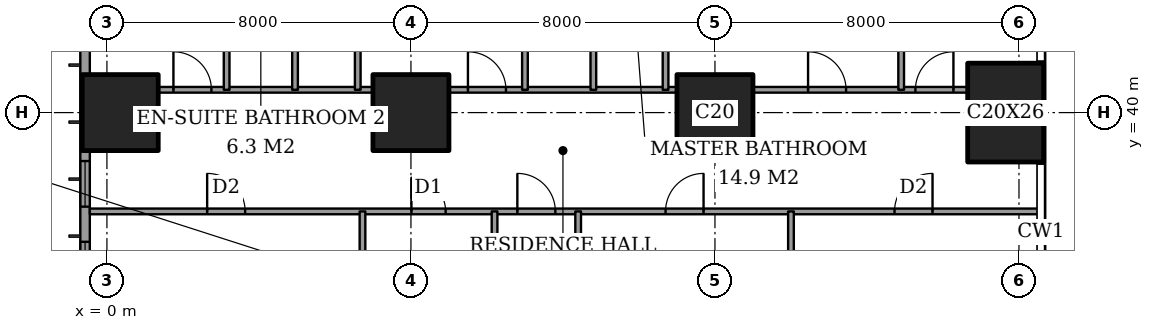
"""IFC4 building model, lengths in metres.
Left out: names, types, materials, properties, quantities, classifications, styles, units other than length and angle.
Written with IfcOpenShell. Run it as: python <this file> out.ifc"""

import sys

from ifc_helpers import new_model, si_unit, direction, frame, frame_2d, origin, origin_2d, place, context, subcontext, project, spatial, rectangle, extrude, element, fill, save


model = new_model("IFC4")
c1 = context("Model", 3, precision=1e-05, world=origin(), true_north=direction((0.0, 1.0)))
c2 = subcontext(c1, "Body", "Model", "MODEL_VIEW")
j1 = project(units=[si_unit("LENGTHUNIT", "METRE"), si_unit("PLANEANGLEUNIT", "RADIAN")], contexts=[c1])
p1 = place(None, origin())
s1 = spatial("IfcSite", under=j1, at=p1, CompositionType="ELEMENT")
p2 = place(p1, origin())
s2 = spatial("IfcBuilding", under=s1, at=p2, CompositionType="ELEMENT")
p3 = place(p2, frame((0.0, 0.0, 121.4)))
s3 = spatial("IfcBuildingStorey", under=s2, at=p3, CompositionType="ELEMENT", Elevation=121.4)
for number, where, z_axis, x_axis in (
    (1, (0.35, 40.0, 0.0), (0.0, 0.0, 1.0), (1.0, 0.0, 0.0)),
    (2, (8.0, 40.0, 0.0), (0.0, 0.0, 1.0), (1.0, 0.0, 0.0)),
    (3, (16.0, 40.0, 0.0), (0.0, 0.0, 1.0), (1.0, 0.0, 0.0)),
):
    element("IfcColumn", number, at=place(p3, frame(where, z_axis=z_axis, x_axis=x_axis)), inside=s3, PredefinedType="COLUMN", context=c2, shape_type="SweptSolid", body=[
        extrude(rectangle(XDim=2.0, YDim=2.0, at=origin_2d()), origin(), (0.0, 0.0, 1.0), 3.6),
    ])
p4 = place(p3, frame((23.65, 40.0, 0.0), z_axis=(0.0, 0.0, 1.0), x_axis=(1.0, 0.0, 0.0)))
e4 = element("IfcColumn", 4, at=p4, inside=s3, PredefinedType="COLUMN", context=c2, shape_type="SweptSolid", body=[
    extrude(rectangle(XDim=2.0, YDim=2.6, at=origin_2d()), origin(), (0.0, 0.0, 1.0), 3.6),
])
p5 = place(p3, frame((-0.575, 44.825, 0.0), z_axis=(0.0, 0.0, 1.0), x_axis=(0.0, -1.0, 0.0)))
e5 = element("IfcWall", 5, at=p5, inside=s3, PredefinedType="SOLIDWALL", context=c2, shape_type="SweptSolid", body=[
    extrude(rectangle(XDim=41.65, YDim=0.25, at=frame_2d((20.825, 0.0))), origin(), (0.0, 0.0, 1.0), 3.6),
])
p6 = place(p5, frame((0.775, 0.0, 0.4)))
e6 = element("IfcOpeningElement", 6, at=p6, cuts=e5, PredefinedType="OPENING", context=c2, shape_type="SweptSolid", body=[
    extrude(rectangle(XDim=2.4, YDim=2.2, at=frame_2d((1.2, 1.1))), frame((0.0, 0.135, 0.0), z_axis=(0.0, -1.0, 0.0), x_axis=(1.0, 0.0, 0.0)), (0.0, 0.0, 1.0), 0.27),
])
p7 = place(p5, frame((6.1, 0.0, 0.4)))
e7 = element("IfcOpeningElement", 7, at=p7, cuts=e5, PredefinedType="OPENING", context=c2, shape_type="SweptSolid", body=[
    extrude(rectangle(XDim=1.2, YDim=2.2, at=frame_2d((0.6, 1.1))), frame((0.0, 0.135, 0.0), z_axis=(0.0, -1.0, 0.0), x_axis=(1.0, 0.0, 0.0)), (0.0, 0.0, 1.0), 0.27),
])
p8 = place(p5, frame((8.225, 0.0, 0.4)))
e8 = element("IfcOpeningElement", 8, at=p8, cuts=e5, PredefinedType="OPENING", context=c2, shape_type="SweptSolid", body=[
    extrude(rectangle(XDim=2.4, YDim=2.2, at=frame_2d((1.2, 1.1))), frame((0.0, 0.135, 0.0), z_axis=(0.0, -1.0, 0.0), x_axis=(1.0, 0.0, 0.0)), (0.0, 0.0, 1.0), 0.27),
])
p9 = place(p5, frame((15.625, 0.0, 0.4)))
e9 = element("IfcOpeningElement", 9, at=p9, cuts=e5, PredefinedType="OPENING", context=c2, shape_type="SweptSolid", body=[
    extrude(rectangle(XDim=2.4, YDim=2.2, at=frame_2d((1.2, 1.1))), frame((0.0, 0.135, 0.0), z_axis=(0.0, -1.0, 0.0), x_axis=(1.0, 0.0, 0.0)), (0.0, 0.0, 1.0), 0.27),
])
p10 = place(p5, frame((23.625, 0.0, 0.4)))
e10 = element("IfcOpeningElement", 10, at=p10, cuts=e5, PredefinedType="OPENING", context=c2, shape_type="SweptSolid", body=[
    extrude(rectangle(XDim=2.4, YDim=2.2, at=frame_2d((1.2, 1.1))), frame((0.0, 0.135, 0.0), z_axis=(0.0, -1.0, 0.0), x_axis=(1.0, 0.0, 0.0)), (0.0, 0.0, 1.0), 0.27),
])
p11 = place(p5, frame((30.825, 0.0, 0.4)))
e11 = element("IfcOpeningElement", 11, at=p11, cuts=e5, PredefinedType="OPENING", context=c2, shape_type="SweptSolid", body=[
    extrude(rectangle(XDim=2.4, YDim=2.2, at=frame_2d((1.2, 1.1))), frame((0.0, 0.135, 0.0), z_axis=(0.0, -1.0, 0.0), x_axis=(1.0, 0.0, 0.0)), (0.0, 0.0, 1.0), 0.27),
])
p12 = place(p5, frame((34.5, 0.0, 0.4)))
e12 = element("IfcOpeningElement", 12, at=p12, cuts=e5, PredefinedType="OPENING", context=c2, shape_type="SweptSolid", body=[
    extrude(rectangle(XDim=1.2, YDim=2.2, at=frame_2d((0.6, 1.1))), frame((0.0, 0.135, 0.0), z_axis=(0.0, -1.0, 0.0), x_axis=(1.0, 0.0, 0.0)), (0.0, 0.0, 1.0), 0.27),
])
p13 = place(p5, frame((38.475, 0.0, 0.4)))
e13 = element("IfcOpeningElement", 13, at=p13, cuts=e5, PredefinedType="OPENING", context=c2, shape_type="SweptSolid", body=[
    extrude(rectangle(XDim=2.4, YDim=2.2, at=frame_2d((1.2, 1.1))), frame((0.0, 0.135, 0.0), z_axis=(0.0, -1.0, 0.0), x_axis=(1.0, 0.0, 0.0)), (0.0, 0.0, 1.0), 0.27),
])
p14 = place(p3, frame((-0.45, 37.4, 0.0), z_axis=(0.0, 0.0, 1.0), x_axis=(1.0, 0.0, 0.0)))
e14 = element("IfcWall", 14, at=p14, inside=s3, PredefinedType="PARTITIONING", context=c2, shape_type="SweptSolid", body=[
    extrude(rectangle(XDim=25.011, YDim=0.15, at=frame_2d((12.505, 0.0))), origin(), (0.0, 0.0, 1.0), 3.35),
])
p15 = place(p14, frame((11.25, 0.0, 0.0)))
e15 = element("IfcOpeningElement", 15, at=p15, cuts=e14, PredefinedType="OPENING", context=c2, shape_type="SweptSolid", body=[
    extrude(rectangle(XDim=1.0, YDim=2.1, at=frame_2d((0.5, 1.05))), frame((0.0, 0.085, 0.0), z_axis=(0.0, -1.0, 0.0), x_axis=(1.0, 0.0, 0.0)), (0.0, 0.0, 1.0), 0.17),
])
p16 = place(p14, frame((3.087, 0.0, 0.0)))
e16 = element("IfcOpeningElement", 16, at=p16, cuts=e14, PredefinedType="OPENING", context=c2, shape_type="SweptSolid", body=[
    extrude(rectangle(XDim=1.0, YDim=2.1, at=frame_2d((0.5, 1.05))), frame((0.0, 0.085, 0.0), z_axis=(0.0, -1.0, 0.0), x_axis=(1.0, 0.0, 0.0)), (0.0, 0.0, 1.0), 0.17),
])
p17 = place(p14, frame((8.462, 0.0, 0.0)))
e17 = element("IfcOpeningElement", 17, at=p17, cuts=e14, PredefinedType="OPENING", context=c2, shape_type="SweptSolid", body=[
    extrude(rectangle(XDim=0.9, YDim=2.1, at=frame_2d((0.45, 1.05))), frame((0.0, 0.085, 0.0), z_axis=(0.0, -1.0, 0.0), x_axis=(1.0, 0.0, 0.0)), (0.0, 0.0, 1.0), 0.17),
])
p18 = place(p14, frame((15.15, 0.0, 0.0)))
e18 = element("IfcOpeningElement", 18, at=p18, cuts=e14, PredefinedType="OPENING", context=c2, shape_type="SweptSolid", body=[
    extrude(rectangle(XDim=1.0, YDim=2.1, at=frame_2d((0.5, 1.05))), frame((0.0, 0.085, 0.0), z_axis=(0.0, -1.0, 0.0), x_axis=(1.0, 0.0, 0.0)), (0.0, 0.0, 1.0), 0.17),
])
p19 = place(p14, frame((21.175, 0.0, 0.0)))
e19 = element("IfcOpeningElement", 19, at=p19, cuts=e14, PredefinedType="OPENING", context=c2, shape_type="SweptSolid", body=[
    extrude(rectangle(XDim=1.0, YDim=2.1, at=frame_2d((0.5, 1.05))), frame((0.0, 0.085, 0.0), z_axis=(0.0, -1.0, 0.0), x_axis=(1.0, 0.0, 0.0)), (0.0, 0.0, 1.0), 0.17),
])
p20 = place(p3, frame((1.35, 40.6, 0.0), z_axis=(0.0, 0.0, 1.0), x_axis=(1.0, 0.0, 0.0)))
e20 = element("IfcWall", 20, at=p20, inside=s3, PredefinedType="PARTITIONING", context=c2, shape_type="SweptSolid", body=[
    extrude(rectangle(XDim=5.65, YDim=0.15, at=frame_2d((2.825, 0.0))), origin(), (0.0, 0.0, 1.0), 3.35),
])
p21 = place(p20, frame((0.4, 0.0, 0.0)))
e21 = element("IfcOpeningElement", 21, at=p21, cuts=e20, PredefinedType="OPENING", context=c2, shape_type="SweptSolid", body=[
    extrude(rectangle(XDim=1.0, YDim=2.1, at=frame_2d((0.5, 1.05))), frame((0.0, 0.085, 0.0), z_axis=(0.0, -1.0, 0.0), x_axis=(1.0, 0.0, 0.0)), (0.0, 0.0, 1.0), 0.17),
])
p22 = place(p3, frame((9.0, 40.6, 0.0), z_axis=(0.0, 0.0, 1.0), x_axis=(1.0, 0.0, 0.0)))
e22 = element("IfcWall", 22, at=p22, inside=s3, PredefinedType="PARTITIONING", context=c2, shape_type="SweptSolid", body=[
    extrude(rectangle(XDim=6.0, YDim=0.15, at=frame_2d((3.0, 0.0))), origin(), (0.0, 0.0, 1.0), 3.35),
])
p23 = place(p22, frame((0.5, 0.0, 0.0)))
e23 = element("IfcOpeningElement", 23, at=p23, cuts=e22, PredefinedType="OPENING", context=c2, shape_type="SweptSolid", body=[
    extrude(rectangle(XDim=1.0, YDim=2.1, at=frame_2d((0.5, 1.05))), frame((0.0, 0.085, 0.0), z_axis=(0.0, -1.0, 0.0), x_axis=(1.0, 0.0, 0.0)), (0.0, 0.0, 1.0), 0.17),
])
p24 = place(p3, frame((17.0, 40.6, 0.0), z_axis=(0.0, 0.0, 1.0), x_axis=(1.0, 0.0, 0.0)))
e24 = element("IfcWall", 24, at=p24, inside=s3, PredefinedType="PARTITIONING", context=c2, shape_type="SweptSolid", body=[
    extrude(rectangle(XDim=5.65, YDim=0.15, at=frame_2d((2.825, 0.0))), origin(), (0.0, 0.0, 1.0), 3.35),
])
p25 = place(p24, frame((1.45, 0.0, 0.0)))
e25 = element("IfcOpeningElement", 25, at=p25, cuts=e24, PredefinedType="OPENING", context=c2, shape_type="SweptSolid", body=[
    extrude(rectangle(XDim=1.0, YDim=2.1, at=frame_2d((0.5, 1.05))), frame((0.0, 0.085, 0.0), z_axis=(0.0, -1.0, 0.0), x_axis=(1.0, 0.0, 0.0)), (0.0, 0.0, 1.0), 0.17),
])
p26 = place(p24, frame((4.275, 0.0, 0.0)))
e26 = element("IfcOpeningElement", 26, at=p26, cuts=e24, PredefinedType="OPENING", context=c2, shape_type="SweptSolid", body=[
    extrude(rectangle(XDim=1.0, YDim=2.1, at=frame_2d((0.5, 1.05))), frame((0.0, 0.085, 0.0), z_axis=(0.0, -1.0, 0.0), x_axis=(1.0, 0.0, 0.0)), (0.0, 0.0, 1.0), 0.17),
])
p27 = place(p3, frame((3.15, 40.6, 0.0), z_axis=(0.0, 0.0, 1.0), x_axis=(0.0, 1.0, 0.0)))
e27 = element("IfcWall", 27, at=p27, inside=s3, PredefinedType="PARTITIONING", context=c2, shape_type="SweptSolid", body=[
    extrude(rectangle(XDim=3.5, YDim=0.15, at=frame_2d((1.75, 0.0))), origin(), (0.0, 0.0, 1.0), 3.35),
])
p28 = place(p27, frame((1.3, 0.0, 0.0)))
e28 = element("IfcOpeningElement", 28, at=p28, cuts=e27, PredefinedType="OPENING", context=c2, shape_type="SweptSolid", body=[
    extrude(rectangle(XDim=0.9, YDim=2.1, at=frame_2d((0.45, 1.05))), frame((0.0, 0.085, 0.0), z_axis=(0.0, -1.0, 0.0), x_axis=(1.0, 0.0, 0.0)), (0.0, 0.0, 1.0), 0.17),
])
p29 = place(p3, frame((4.95, 40.6, 0.0), z_axis=(0.0, 0.0, 1.0), x_axis=(0.0, 1.0, 0.0)))
e29 = element("IfcWall", 29, at=p29, inside=s3, PredefinedType="PARTITIONING", context=c2, shape_type="SweptSolid", body=[
    extrude(rectangle(XDim=7.85, YDim=0.15, at=frame_2d((3.925, 0.0))), origin(), (0.0, 0.0, 1.0), 3.35),
])
p30 = place(p29, frame((5.225, 0.0, 0.0)))
e30 = element("IfcOpeningElement", 30, at=p30, cuts=e29, PredefinedType="OPENING", context=c2, shape_type="SweptSolid", body=[
    extrude(rectangle(XDim=0.9, YDim=2.1, at=frame_2d((0.45, 1.05))), frame((0.0, 0.085, 0.0), z_axis=(0.0, -1.0, 0.0), x_axis=(1.0, 0.0, 0.0)), (0.0, 0.0, 1.0), 0.17),
])
p31 = place(p3, frame((6.6, 40.6, 0.0), z_axis=(0.0, 0.0, 1.0), x_axis=(0.0, 1.0, 0.0)))
e31 = element("IfcWall", 31, at=p31, inside=s3, PredefinedType="PARTITIONING", context=c2, shape_type="SweptSolid", body=[
    extrude(rectangle(XDim=7.85, YDim=0.15, at=frame_2d((3.925, 0.0))), origin(), (0.0, 0.0, 1.0), 3.35),
])
p32 = place(p3, frame((6.725, 33.2, 0.0), z_axis=(0.0, 0.0, 1.0), x_axis=(0.0, 1.0, 0.0)))
e32 = element("IfcWall", 32, at=p32, inside=s3, PredefinedType="PARTITIONING", context=c2, shape_type="SweptSolid", body=[
    extrude(rectangle(XDim=4.2, YDim=0.15, at=frame_2d((2.1, 0.0))), origin(), (0.0, 0.0, 1.0), 3.35),
])
p33 = place(p3, frame((10.2, 28.0, 0.0), z_axis=(0.0, 0.0, 1.0), x_axis=(0.0, 1.0, 0.0)))
e33 = element("IfcWall", 33, at=p33, inside=s3, PredefinedType="PARTITIONING", context=c2, shape_type="SweptSolid", body=[
    extrude(rectangle(XDim=9.4, YDim=0.15, at=frame_2d((4.7, 0.0))), origin(), (0.0, 0.0, 1.0), 3.35),
])
p34 = place(p33, frame((0.837, 0.0, 0.0)))
e34 = element("IfcOpeningElement", 34, at=p34, cuts=e33, PredefinedType="OPENING", context=c2, shape_type="SweptSolid", body=[
    extrude(rectangle(XDim=1.0, YDim=2.1, at=frame_2d((0.5, 1.05))), frame((0.0, 0.085, 0.0), z_axis=(0.0, -1.0, 0.0), x_axis=(1.0, 0.0, 0.0)), (0.0, 0.0, 1.0), 0.17),
])
p35 = place(p3, frame((11.0, 40.6, 0.0), z_axis=(0.0, 0.0, 1.0), x_axis=(0.0, 1.0, 0.0)))
e35 = element("IfcWall", 35, at=p35, inside=s3, PredefinedType="PARTITIONING", context=c2, shape_type="SweptSolid", body=[
    extrude(rectangle(XDim=7.85, YDim=0.15, at=frame_2d((3.925, 0.0))), origin(), (0.0, 0.0, 1.0), 3.35),
])
p36 = place(p35, frame((3.475, 0.0, 0.0)))
e36 = element("IfcOpeningElement", 36, at=p36, cuts=e35, PredefinedType="OPENING", context=c2, shape_type="SweptSolid", body=[
    extrude(rectangle(XDim=0.9, YDim=2.1, at=frame_2d((0.45, 1.05))), frame((0.0, 0.085, 0.0), z_axis=(0.0, -1.0, 0.0), x_axis=(1.0, 0.0, 0.0)), (0.0, 0.0, 1.0), 0.17),
])
p37 = place(p3, frame((12.4, 30.675, 0.0), z_axis=(0.0, 0.0, 1.0), x_axis=(0.0, 1.0, 0.0)))
e37 = element("IfcWall", 37, at=p37, inside=s3, PredefinedType="PARTITIONING", context=c2, shape_type="SweptSolid", body=[
    extrude(rectangle(XDim=6.725, YDim=0.15, at=frame_2d((3.362, 0.0))), origin(), (0.0, 0.0, 1.0), 3.35),
])
p38 = place(p3, frame((12.8, 40.6, 0.0), z_axis=(0.0, 0.0, 1.0), x_axis=(0.0, 1.0, 0.0)))
e38 = element("IfcWall", 38, at=p38, inside=s3, PredefinedType="PARTITIONING", context=c2, shape_type="SweptSolid", body=[
    extrude(rectangle(XDim=7.85, YDim=0.15, at=frame_2d((3.925, 0.0))), origin(), (0.0, 0.0, 1.0), 3.35),
])
p39 = place(p3, frame((14.7, 40.6, 0.0), z_axis=(0.0, 0.0, 1.0), x_axis=(0.0, 1.0, 0.0)))
e39 = element("IfcWall", 39, at=p39, inside=s3, PredefinedType="PARTITIONING", context=c2, shape_type="SweptSolid", body=[
    extrude(rectangle(XDim=7.85, YDim=0.15, at=frame_2d((3.925, 0.0))), origin(), (0.0, 0.0, 1.0), 3.35),
])
p40 = place(p39, frame((3.475, 0.0, 0.0)))
e40 = element("IfcOpeningElement", 40, at=p40, cuts=e39, PredefinedType="OPENING", context=c2, shape_type="SweptSolid", body=[
    extrude(rectangle(XDim=0.9, YDim=2.1, at=frame_2d((0.45, 1.05))), frame((0.0, 0.085, 0.0), z_axis=(0.0, -1.0, 0.0), x_axis=(1.0, 0.0, 0.0)), (0.0, 0.0, 1.0), 0.17),
])
p41 = place(p3, frame((18.0, 28.0, 0.0), z_axis=(0.0, 0.0, 1.0), x_axis=(0.0, 1.0, 0.0)))
e41 = element("IfcWall", 41, at=p41, inside=s3, PredefinedType="PARTITIONING", context=c2, shape_type="SweptSolid", body=[
    extrude(rectangle(XDim=9.4, YDim=0.15, at=frame_2d((4.7, 0.0))), origin(), (0.0, 0.0, 1.0), 3.35),
])
p42 = place(p41, frame((0.837, 0.0, 0.0)))
e42 = element("IfcOpeningElement", 42, at=p42, cuts=e41, PredefinedType="OPENING", context=c2, shape_type="SweptSolid", body=[
    extrude(rectangle(XDim=1.0, YDim=2.1, at=frame_2d((0.5, 1.05))), frame((0.0, 0.085, 0.0), z_axis=(0.0, -1.0, 0.0), x_axis=(1.0, 0.0, 0.0)), (0.0, 0.0, 1.0), 0.17),
])
p43 = place(p3, frame((20.9, 40.6, 0.0), z_axis=(0.0, 0.0, 1.0), x_axis=(0.0, 1.0, 0.0)))
e43 = element("IfcWall", 43, at=p43, inside=s3, PredefinedType="PARTITIONING", context=c2, shape_type="SweptSolid", body=[
    extrude(rectangle(XDim=7.85, YDim=0.15, at=frame_2d((3.925, 0.0))), origin(), (0.0, 0.0, 1.0), 3.35),
])
p44 = place(p7, origin())
e44 = element("IfcWindow", 44, at=p44, inside=s3, PartitioningType="SINGLE_PANEL", PredefinedType="WINDOW", context=c2, shape_type="SweptSolid", body=[
    extrude(rectangle(XDim=1.2, YDim=2.2, at=frame_2d((0.6, 1.1))), frame((0.0, 0.03, 0.0), z_axis=(0.0, -1.0, 0.0), x_axis=(1.0, 0.0, 0.0)), (0.0, 0.0, 1.0), 0.06),
])
fill(e7, e44)
p45 = place(p8, origin())
e45 = element("IfcWindow", 45, at=p45, inside=s3, PartitioningType="SINGLE_PANEL", PredefinedType="WINDOW", context=c2, shape_type="SweptSolid", body=[
    extrude(rectangle(XDim=2.4, YDim=2.2, at=frame_2d((1.2, 1.1))), frame((0.0, 0.03, 0.0), z_axis=(0.0, -1.0, 0.0), x_axis=(1.0, 0.0, 0.0)), (0.0, 0.0, 1.0), 0.06),
])
fill(e8, e45)
p46 = place(p21, origin())
e46 = element("IfcDoor", 46, at=p46, inside=s3, OperationType="SINGLE_SWING_RIGHT", PredefinedType="DOOR", context=c2, shape_type="SweptSolid", body=[
    extrude(rectangle(XDim=1.0, YDim=2.1, at=frame_2d((0.5, 1.05))), frame((0.0, 0.025, 0.0), z_axis=(0.0, -1.0, 0.0), x_axis=(1.0, 0.0, 0.0)), (0.0, 0.0, 1.0), 0.05),
])
fill(e21, e46)
p47 = place(p23, origin())
e47 = element("IfcDoor", 47, at=p47, inside=s3, OperationType="SINGLE_SWING_RIGHT", PredefinedType="DOOR", context=c2, shape_type="SweptSolid", body=[
    extrude(rectangle(XDim=1.0, YDim=2.1, at=frame_2d((0.5, 1.05))), frame((0.0, 0.025, 0.0), z_axis=(0.0, -1.0, 0.0), x_axis=(1.0, 0.0, 0.0)), (0.0, 0.0, 1.0), 0.05),
])
fill(e23, e47)
p48 = place(p25, origin())
e48 = element("IfcDoor", 48, at=p48, inside=s3, OperationType="SINGLE_SWING_RIGHT", PredefinedType="DOOR", context=c2, shape_type="SweptSolid", body=[
    extrude(rectangle(XDim=1.0, YDim=2.1, at=frame_2d((0.5, 1.05))), frame((0.0, 0.025, 0.0), z_axis=(0.0, -1.0, 0.0), x_axis=(1.0, 0.0, 0.0)), (0.0, 0.0, 1.0), 0.05),
])
fill(e25, e48)
p49 = place(p26, origin())
e49 = element("IfcDoor", 49, at=p49, inside=s3, OperationType="SINGLE_SWING_LEFT", PredefinedType="DOOR", context=c2, shape_type="SweptSolid", body=[
    extrude(rectangle(XDim=1.0, YDim=2.1, at=frame_2d((0.5, 1.05))), frame((0.0, 0.025, 0.0), z_axis=(0.0, -1.0, 0.0), x_axis=(1.0, 0.0, 0.0)), (0.0, 0.0, 1.0), 0.05),
])
fill(e26, e49)
p50 = place(p15, origin())
e50 = element("IfcDoor", 50, at=p50, inside=s3, OperationType="SINGLE_SWING_RIGHT", PredefinedType="DOOR", context=c2, shape_type="SweptSolid", body=[
    extrude(rectangle(XDim=1.0, YDim=2.1, at=frame_2d((0.5, 1.05))), frame((0.0, 0.025, 0.0), z_axis=(0.0, -1.0, 0.0), x_axis=(1.0, 0.0, 0.0)), (0.0, 0.0, 1.0), 0.05),
])
fill(e15, e50)
p51 = place(p16, origin())
e51 = element("IfcDoor", 51, at=p51, inside=s3, OperationType="SINGLE_SWING_RIGHT", PredefinedType="DOOR", context=c2, shape_type="SweptSolid", body=[
    extrude(rectangle(XDim=1.0, YDim=2.1, at=frame_2d((0.5, 1.05))), frame((0.0, 0.025, 0.0), z_axis=(0.0, -1.0, 0.0), x_axis=(1.0, 0.0, 0.0)), (0.0, 0.0, 1.0), 0.05),
])
fill(e16, e51)
p52 = place(p17, origin())
e52 = element("IfcDoor", 52, at=p52, inside=s3, OperationType="SINGLE_SWING_RIGHT", PredefinedType="DOOR", context=c2, shape_type="SweptSolid", body=[
    extrude(rectangle(XDim=0.9, YDim=2.1, at=frame_2d((0.45, 1.05))), frame((0.0, 0.025, 0.0), z_axis=(0.0, -1.0, 0.0), x_axis=(1.0, 0.0, 0.0)), (0.0, 0.0, 1.0), 0.05),
])
fill(e17, e52)
p53 = place(p18, origin())
e53 = element("IfcDoor", 53, at=p53, inside=s3, OperationType="SINGLE_SWING_LEFT", PredefinedType="DOOR", context=c2, shape_type="SweptSolid", body=[
    extrude(rectangle(XDim=1.0, YDim=2.1, at=frame_2d((0.5, 1.05))), frame((0.0, 0.025, 0.0), z_axis=(0.0, -1.0, 0.0), x_axis=(1.0, 0.0, 0.0)), (0.0, 0.0, 1.0), 0.05),
])
fill(e18, e53)
p54 = place(p19, origin())
e54 = element("IfcDoor", 54, at=p54, inside=s3, OperationType="SINGLE_SWING_LEFT", PredefinedType="DOOR", context=c2, shape_type="SweptSolid", body=[
    extrude(rectangle(XDim=1.0, YDim=2.1, at=frame_2d((0.5, 1.05))), frame((0.0, 0.025, 0.0), z_axis=(0.0, -1.0, 0.0), x_axis=(1.0, 0.0, 0.0)), (0.0, 0.0, 1.0), 0.05),
])
fill(e19, e54)
save(model, sys.argv[1])
